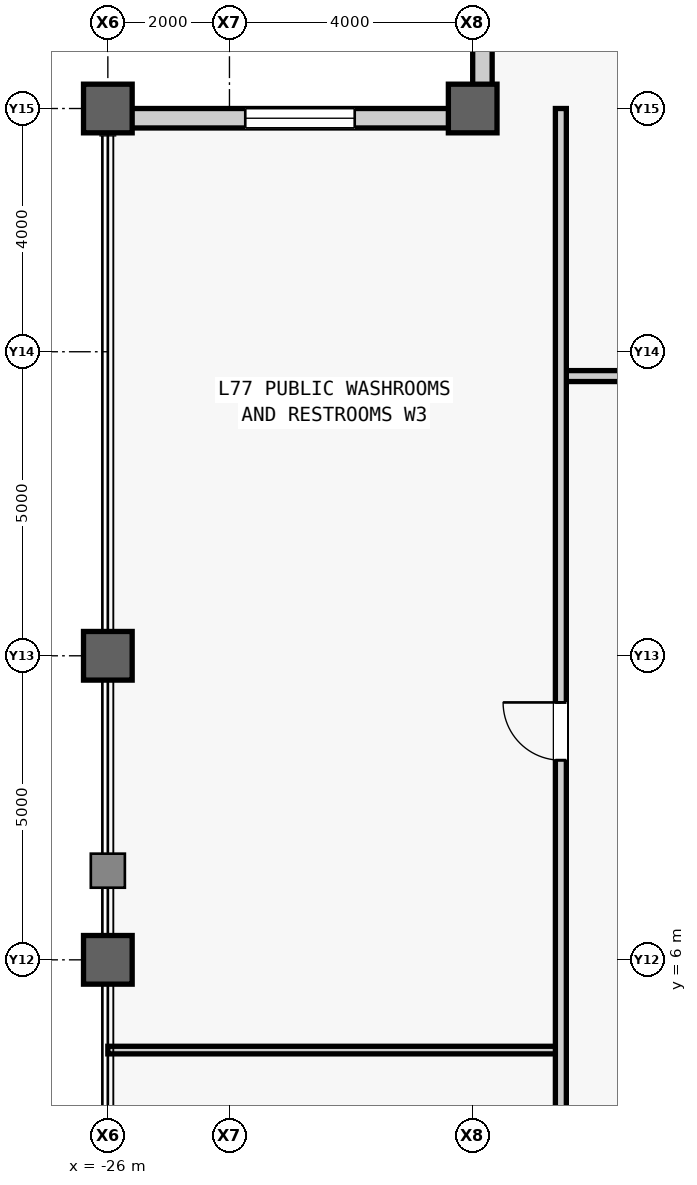
"""IFC4 building model, lengths in metres.
Left out: names, types, materials, properties, quantities, classifications, styles, units other than length and angle.
Written with IfcOpenShell. Run it as: python <this file> out.ifc"""

import sys

from ifc_helpers import new_model, si_unit, direction, frame, frame_2d, origin, origin_2d, place, context, subcontext, project, spatial, rectangle, hollow_rectangle, extrude, source, transform, mapped, element, fill, save


model = new_model("IFC4")
c1 = context("Model", 3, precision=1e-05, world=origin(), true_north=direction((0.0, 1.0)))
c2 = subcontext(c1, "Body", "Model", "MODEL_VIEW")
j1 = project(units=[si_unit("LENGTHUNIT", "METRE"), si_unit("PLANEANGLEUNIT", "RADIAN")], contexts=[c1])
p1 = place(None, origin())
s1 = spatial("IfcSite", under=j1, at=p1, CompositionType="ELEMENT")
p2 = place(p1, origin())
s2 = spatial("IfcBuilding", under=s1, at=p2, CompositionType="ELEMENT")
p3 = place(p2, frame((0.0, 0.0, 326.3)))
s3 = spatial("IfcBuildingStorey", under=s2, at=p3, CompositionType="ELEMENT", Elevation=326.3)
m1 = source(origin(), c2, "Body", "SweptSolid", [
    extrude(hollow_rectangle(XDim=0.8, YDim=0.8, WallThickness=0.045, at=origin_2d()), origin(), (0.0, 0.0, 1.0), 4.0),
])
for number, where, z_axis, x_axis in (
    (1, (-26.0, 6.0, 0.0), (0.0, 0.0, 1.0), (1.0, 0.0, 0.0)),
    (2, (-26.0, 11.0, 0.0), (0.0, 0.0, 1.0), (1.0, 0.0, 0.0)),
    (3, (-26.0, 20.0, 0.0), (0.0, 0.0, 1.0), (1.0, 0.0, 0.0)),
    (4, (-20.0, 20.0, 0.0), (0.0, 0.0, 1.0), (1.0, 0.0, 0.0)),
):
    element("IfcColumn", number, at=place(p3, frame(where, z_axis=z_axis, x_axis=x_axis)), inside=s3, PredefinedType="COLUMN", context=c2, shape_type="MappedRepresentation", body=[
        mapped(m1, transform((0.0, 0.0, 0.0), scale=1.0)),
    ])
m2 = source(origin(), c2, "Body", "SweptSolid", [
    extrude(rectangle(XDim=5.68, YDim=0.32, at=frame_2d((2.84, 0.0))), origin(), (0.0, 0.0, 1.0), 3.191),
])
p4 = place(p3, frame((-19.84, 20.0, 0.0), z_axis=(0.0, 0.0, 1.0), x_axis=(0.0, 1.0, 0.0)))
e5 = element("IfcWall", 5, at=p4, inside=s3, PredefinedType="STANDARD", context=c2, shape_type="MappedRepresentation", body=[
    mapped(m2, transform((0.0, 0.0, 0.0), scale=1.0)),
])
m3 = source(origin(), c2, "Body", "SweptSolid", [
    extrude(rectangle(XDim=1.8, YDim=2.4, at=frame_2d((0.9, 1.2))), frame((0.0, 0.17, 0.0), z_axis=(0.0, -1.0, 0.0), x_axis=(1.0, 0.0, 0.0)), (0.0, 0.0, 1.0), 0.34),
])
p5 = place(p4, frame((1.94, 0.0, 0.5)))
e6 = element("IfcOpeningElement", 6, at=p5, cuts=e5, PredefinedType="OPENING", context=c2, shape_type="MappedRepresentation", body=[
    mapped(m3, transform((0.0, 0.0, 0.0), scale=1.0)),
])
p6 = place(p3, frame((-20.0, 19.84, 0.0), z_axis=(0.0, 0.0, 1.0), x_axis=(-1.0, 0.0, 0.0)))
e7 = element("IfcWall", 7, at=p6, inside=s3, PredefinedType="STANDARD", context=c2, shape_type="MappedRepresentation", body=[
    mapped(m2, transform((0.0, 0.0, 0.0), scale=1.0)),
])
p7 = place(p6, frame((1.94, 0.0, 0.5)))
e8 = element("IfcOpeningElement", 8, at=p7, cuts=e7, PredefinedType="OPENING", context=c2, shape_type="MappedRepresentation", body=[
    mapped(m3, transform((0.0, 0.0, 0.0), scale=1.0)),
])
m4 = source(origin(), c2, "Body", "SweptSolid", [
    extrude(rectangle(XDim=1.15, YDim=0.18, at=frame_2d((0.575, 0.0))), origin(), (0.0, 0.0, 1.0), 3.74),
])
p8 = place(p3, frame((-18.55, 15.6, 0.0), z_axis=(0.0, 0.0, 1.0), x_axis=(1.0, 0.0, 0.0)))
e9 = element("IfcWall", 9, at=p8, inside=s3, PredefinedType="PARTITIONING", context=c2, shape_type="MappedRepresentation", body=[
    mapped(m4, transform((0.0, 0.0, 0.0), scale=1.0)),
])
m5 = source(origin(), c2, "Body", "SweptSolid", [
    extrude(rectangle(XDim=7.45, YDim=0.125, at=frame_2d((3.725, 0.0))), origin(), (0.0, 0.0, 1.0), 3.74),
])
p9 = place(p3, frame((-26.0, 4.516, 0.0), z_axis=(0.0, 0.0, 1.0), x_axis=(1.0, 0.0, 0.0)))
e10 = element("IfcWall", 10, at=p9, inside=s3, PredefinedType="PARTITIONING", context=c2, shape_type="MappedRepresentation", body=[
    mapped(m5, transform((0.0, 0.0, 0.0), scale=1.0)),
])
m6 = source(origin(), c2, "Body", "SweptSolid", [
    extrude(rectangle(XDim=39.4, YDim=0.18, at=frame_2d((19.7, 0.0))), origin(), (0.0, 0.0, 1.0), 3.74),
])
p10 = place(p3, frame((-18.55, -19.4, 0.0), z_axis=(0.0, 0.0, 1.0), x_axis=(0.0, 1.0, 0.0)))
e11 = element("IfcWall", 11, at=p10, inside=s3, PredefinedType="PARTITIONING", context=c2, shape_type="MappedRepresentation", body=[
    mapped(m6, transform((0.0, 0.0, 0.0), scale=1.0)),
])
m7 = source(origin(), c2, "Body", "SweptSolid", [
    extrude(rectangle(XDim=0.95, YDim=2.15, at=frame_2d((0.475, 1.075))), frame((0.0, 0.1, 0.0), z_axis=(0.0, -1.0, 0.0), x_axis=(1.0, 0.0, 0.0)), (0.0, 0.0, 1.0), 0.2),
])
p11 = place(p10, frame((7.441, 0.0, 0.0)))
e12 = element("IfcOpeningElement", 12, at=p11, cuts=e11, PredefinedType="OPENING", context=c2, shape_type="MappedRepresentation", body=[
    mapped(m7, transform((0.0, 0.0, 0.0), scale=1.0)),
])
p12 = place(p10, frame((17.899, 0.0, 0.0)))
e13 = element("IfcOpeningElement", 13, at=p12, cuts=e11, PredefinedType="OPENING", context=c2, shape_type="MappedRepresentation", body=[
    mapped(m7, transform((0.0, 0.0, 0.0), scale=1.0)),
])
p13 = place(p10, frame((28.683, 0.0, 0.0)))
e14 = element("IfcOpeningElement", 14, at=p13, cuts=e11, PredefinedType="OPENING", context=c2, shape_type="MappedRepresentation", body=[
    mapped(m7, transform((0.0, 0.0, 0.0), scale=1.0)),
])
m8 = source(origin(), c2, "Body", "SweptSolid", [
    extrude(rectangle(XDim=1.8, YDim=2.4, at=frame_2d((0.9, 1.2))), frame((0.0, 0.03, 0.0), z_axis=(0.0, -1.0, 0.0), x_axis=(1.0, 0.0, 0.0)), (0.0, 0.0, 1.0), 0.06),
])
p14 = place(p7, origin())
e15 = element("IfcWindow", 15, at=p14, inside=s3, PartitioningType="SINGLE_PANEL", PredefinedType="WINDOW", context=c2, shape_type="MappedRepresentation", body=[
    mapped(m8, transform((0.0, 0.0, 0.0), scale=1.0)),
])
fill(e8, e15)
m9 = source(origin(), c2, "Body", "SweptSolid", [
    extrude(rectangle(XDim=0.95, YDim=2.15, at=frame_2d((0.475, 1.075))), frame((0.0, 0.025, 0.0), z_axis=(0.0, -1.0, 0.0), x_axis=(1.0, 0.0, 0.0)), (0.0, 0.0, 1.0), 0.05),
])
p15 = place(p13, origin())
e16 = element("IfcDoor", 16, at=p15, inside=s3, OperationType="SINGLE_SWING_RIGHT", PredefinedType="DOOR", context=c2, shape_type="MappedRepresentation", body=[
    mapped(m9, transform((0.0, 0.0, 0.0), scale=1.0)),
])
fill(e14, e16)
save(model, sys.argv[1])
